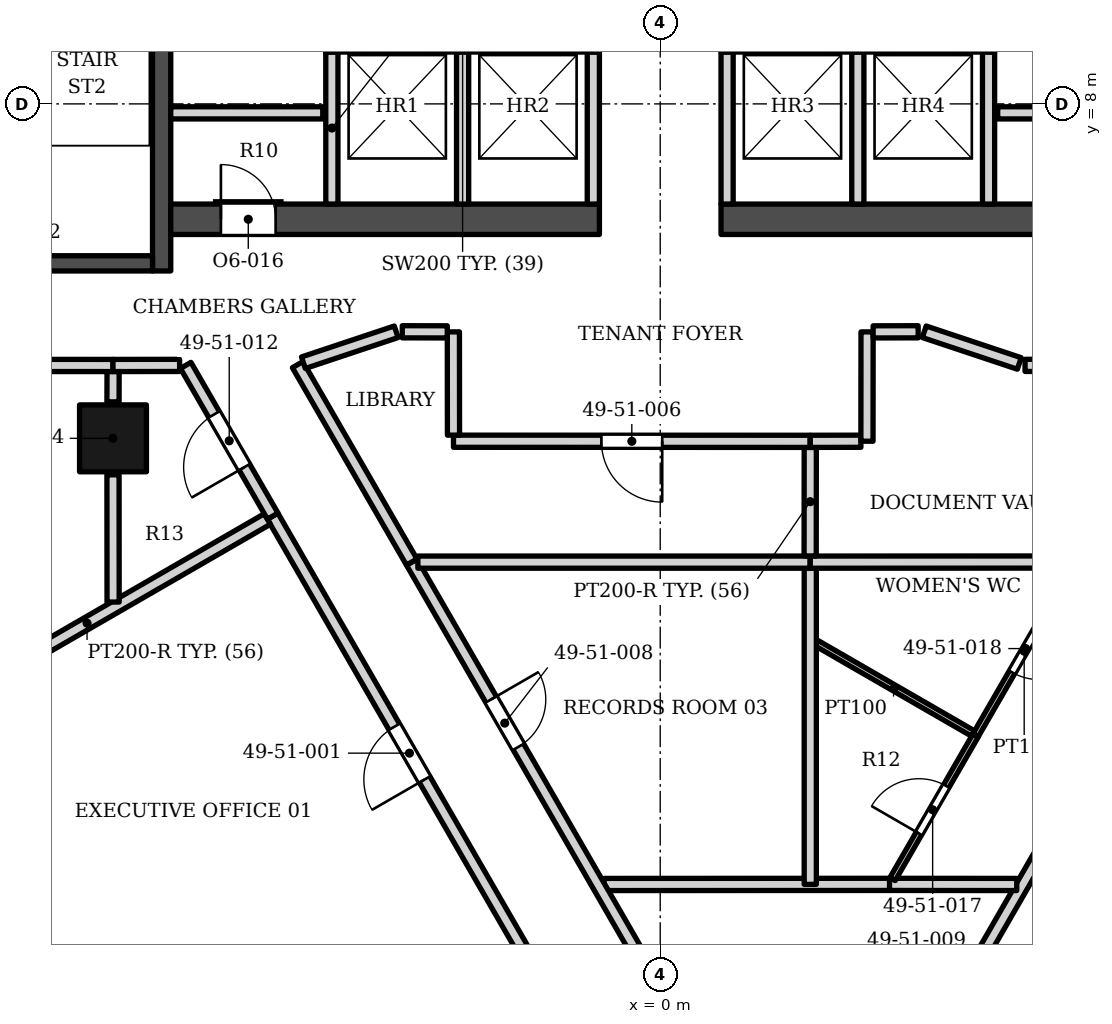
"""IFC4 building model, lengths in metres.
Left out: names, types, materials, properties, quantities, classifications, styles, units other than length and angle.
Written with IfcOpenShell. Run it as: python <this file> out.ifc"""

import sys

from ifc_helpers import new_model, si_unit, direction, frame, frame_2d, origin, origin_2d, place, context, subcontext, project, spatial, rectangle, extrude, element, fill, save


model = new_model("IFC4")
c1 = context("Model", 3, precision=1e-05, world=origin(), true_north=direction((0.0, 1.0)))
c2 = subcontext(c1, "Body", "Model", "MODEL_VIEW")
j1 = project(units=[si_unit("LENGTHUNIT", "METRE"), si_unit("PLANEANGLEUNIT", "RADIAN")], contexts=[c1])
p1 = place(None, origin())
s1 = spatial("IfcSite", under=j1, at=p1, CompositionType="ELEMENT")
p2 = place(p1, origin())
s2 = spatial("IfcBuilding", under=s1, at=p2, CompositionType="ELEMENT")
p3 = place(p2, frame((0.0, 0.0, 208.1)))
s3 = spatial("IfcBuildingStorey", under=s2, at=p3, CompositionType="ELEMENT", Elevation=208.1)
p4 = place(p3, frame((-8.2, 5.253, 0.0), z_axis=(0.0, 0.0, 1.0), x_axis=(0.0, 1.0, 0.0)))
e1 = element("IfcWall", 1, at=p4, inside=s3, PredefinedType="SHEAR", context=c2, shape_type="SweptSolid", body=[
    extrude(rectangle(XDim=13.3, YDim=0.3, at=frame_2d((6.65, 0.0))), origin(), (0.0, 0.0, 1.0), 3.9),
])
p5 = place(p4, frame((7.1, 0.0, 0.0)))
e2 = element("IfcOpeningElement", 2, at=p5, cuts=e1, PredefinedType="OPENING", context=c2, shape_type="SweptSolid", body=[
    extrude(rectangle(XDim=1.4, YDim=2.1, at=frame_2d((0.7, 1.05))), frame((0.0, 0.16, 0.0), z_axis=(0.0, -1.0, 0.0), x_axis=(1.0, 0.0, 0.0)), (0.0, 0.0, 1.0), 0.32),
])
p6 = place(p4, frame((5.05, 0.0, 0.0)))
e3 = element("IfcOpeningElement", 3, at=p6, cuts=e1, PredefinedType="OPENING", context=c2, shape_type="SweptSolid", body=[
    extrude(rectangle(XDim=1.4, YDim=2.1, at=frame_2d((0.7, 1.05))), frame((0.0, 0.16, 0.0), z_axis=(0.0, -1.0, 0.0), x_axis=(1.0, 0.0, 0.0)), (0.0, 0.0, 1.0), 0.32),
])
p7 = place(p3, frame((-12.1, 5.378, 0.0), z_axis=(0.0, 0.0, 1.0), x_axis=(1.0, 0.0, 0.0)))
e4 = element("IfcWall", 4, at=p7, inside=s3, PredefinedType="SHEAR", context=c2, shape_type="SweptSolid", body=[
    extrude(rectangle(XDim=3.75, YDim=0.25, at=frame_2d((1.875, 0.0))), origin(), (0.0, 0.0, 1.0), 3.9),
])
p8 = place(p3, frame((-8.05, 6.103, 0.0), z_axis=(0.0, 0.0, 1.0), x_axis=(1.0, 0.0, 0.0)))
e5 = element("IfcWall", 5, at=p8, inside=s3, PredefinedType="SHEAR", context=c2, shape_type="SweptSolid", body=[
    extrude(rectangle(XDim=7.05, YDim=0.5, at=frame_2d((3.525, 0.0))), origin(), (0.0, 0.0, 1.0), 3.9),
])
p9 = place(p8, frame((0.825, 0.0, 0.0)))
e6 = element("IfcOpeningElement", 6, at=p9, cuts=e5, PredefinedType="OPENING", context=c2, shape_type="SweptSolid", body=[
    extrude(rectangle(XDim=0.9, YDim=2.1, at=frame_2d((0.45, 1.05))), frame((0.0, 0.26, 0.0), z_axis=(0.0, -1.0, 0.0), x_axis=(1.0, 0.0, 0.0)), (0.0, 0.0, 1.0), 0.52),
])
p10 = place(p3, frame((1.0, 6.103, 0.0), z_axis=(0.0, 0.0, 1.0), x_axis=(1.0, 0.0, 0.0)))
e7 = element("IfcWall", 7, at=p10, inside=s3, PredefinedType="SHEAR", context=c2, shape_type="SweptSolid", body=[
    extrude(rectangle(XDim=7.05, YDim=0.5, at=frame_2d((3.525, 0.0))), origin(), (0.0, 0.0, 1.0), 3.9),
])
p11 = place(p10, frame((5.325, 0.0, 0.0)))
e8 = element("IfcOpeningElement", 8, at=p11, cuts=e7, PredefinedType="OPENING", context=c2, shape_type="SweptSolid", body=[
    extrude(rectangle(XDim=0.9, YDim=2.1, at=frame_2d((0.45, 1.05))), frame((0.0, 0.26, 0.0), z_axis=(0.0, -1.0, 0.0), x_axis=(1.0, 0.0, 0.0)), (0.0, 0.0, 1.0), 0.52),
])
p12 = place(p3, frame((-9.0, 2.5, 0.0), z_axis=(0.0, 0.0, 1.0), x_axis=(1.0, 0.0, 0.0)))
e9 = element("IfcColumn", 9, at=p12, inside=s3, PredefinedType="COLUMN", context=c2, shape_type="SweptSolid", body=[
    extrude(rectangle(XDim=1.1, YDim=1.1, at=origin_2d()), origin(), (0.0, 0.0, 1.0), 3.9),
])
for number, where, z_axis, x_axis in (
    (10, (-5.4, 6.353, 0.0), (0.0, 0.0, 1.0), (0.0, 1.0, 0.0)),
    (11, (-3.25, 6.353, 0.0), (0.0, 0.0, 1.0), (0.0, 1.0, 0.0)),
    (12, (-1.1, 6.353, 0.0), (0.0, 0.0, 1.0), (0.0, 1.0, 0.0)),
    (13, (1.1, 6.353, 0.0), (0.0, 0.0, 1.0), (0.0, 1.0, 0.0)),
    (14, (3.25, 6.353, 0.0), (0.0, 0.0, 1.0), (0.0, 1.0, 0.0)),
    (15, (5.4, 6.353, 0.0), (0.0, 0.0, 1.0), (0.0, 1.0, 0.0)),
    (16, (-8.05, 7.853, 0.0), (0.0, 0.0, 1.0), (1.0, 0.0, 0.0)),
    (17, (5.55, 7.853, 0.0), (0.0, 0.0, 1.0), (1.0, 0.0, 0.0)),
):
    element("IfcWall", number, at=place(p3, frame(where, z_axis=z_axis, x_axis=x_axis)), inside=s3, PredefinedType="SOLIDWALL", context=c2, shape_type="SweptSolid", body=[
        extrude(rectangle(XDim=2.5, YDim=0.2, at=frame_2d((1.25, 0.0))), origin(), (0.0, 0.0, 1.0), 3.73),
    ])
p13 = place(p3, frame((2.469, -10.893, 0.0), z_axis=(0.0, 0.0, 1.0), x_axis=(0.499769731946, 0.866158308296, 0.0)))
e18 = element("IfcWall", 18, at=p13, inside=s3, PredefinedType="PARTITIONING", context=c2, shape_type="SweptSolid", body=[
    extrude(rectangle(XDim=13.113, YDim=0.2, at=frame_2d((6.557, 0.0))), origin(), (0.0, 0.0, 1.0), 2.884),
])
p14 = place(p13, frame((3.048, 0.0, 0.0)))
e19 = element("IfcOpeningElement", 19, at=p14, cuts=e18, PredefinedType="OPENING", context=c2, shape_type="SweptSolid", body=[
    extrude(rectangle(XDim=0.9, YDim=2.1, at=frame_2d((0.45, 1.05))), frame((0.0, 0.11, 0.0), z_axis=(0.0, -1.0, 0.0), x_axis=(1.0, 0.0, 0.0)), (0.0, 0.0, 1.0), 0.22),
])
p15 = place(p13, frame((9.556, 0.0, 0.0)))
e20 = element("IfcOpeningElement", 20, at=p15, cuts=e18, PredefinedType="OPENING", context=c2, shape_type="SweptSolid", body=[
    extrude(rectangle(XDim=1.0, YDim=2.1, at=frame_2d((0.5, 1.05))), frame((0.0, 0.11, 0.0), z_axis=(0.0, -1.0, 0.0), x_axis=(1.0, 0.0, 0.0)), (0.0, 0.0, 1.0), 0.22),
])
p16 = place(p3, frame((-6.374, 1.22, 0.0), z_axis=(0.0, 0.0, 1.0), x_axis=(0.5000018851, -0.866024315419, 0.0)))
e21 = element("IfcWall", 21, at=p16, inside=s3, PredefinedType="PARTITIONING", context=c2, shape_type="SweptSolid", body=[
    extrude(rectangle(XDim=9.0, YDim=0.2, at=frame_2d((4.5, 0.0))), origin(), (0.0, 0.0, 1.0), 2.884),
])
p17 = place(p16, frame((4.0, 0.0, 0.0)))
e22 = element("IfcOpeningElement", 22, at=p17, cuts=e21, PredefinedType="OPENING", context=c2, shape_type="SweptSolid", body=[
    extrude(rectangle(XDim=1.0, YDim=2.4, at=frame_2d((0.5, 1.2))), frame((0.0, 0.11, 0.0), z_axis=(0.0, -1.0, 0.0), x_axis=(1.0, 0.0, 0.0)), (0.0, 0.0, 1.0), 0.22),
])
p18 = place(p3, frame((-0.925, -4.837, 0.0), z_axis=(0.0, 0.0, 1.0), x_axis=(0.999999933905, 0.000363579678, 0.0)))
e23 = element("IfcWall", 23, at=p18, inside=s3, PredefinedType="PARTITIONING", context=c2, shape_type="SweptSolid", body=[
    extrude(rectangle(XDim=4.7, YDim=0.2, at=frame_2d((2.35, 0.0))), origin(), (0.0, 0.0, 1.0), 3.73),
])
p19 = place(p3, frame((3.771, -4.835, 0.0), z_axis=(0.0, 0.0, 1.0), x_axis=(0.999999666495, -0.00081670723, 0.0)))
e24 = element("IfcWall", 24, at=p19, inside=s3, PredefinedType="PARTITIONING", context=c2, shape_type="SweptSolid", body=[
    extrude(rectangle(XDim=2.093, YDim=0.2, at=frame_2d((1.046, 0.0))), origin(), (0.0, 0.0, 1.0), 3.73),
])
p20 = place(p3, frame((3.821, -4.748, 0.0), z_axis=(0.0, 0.0, 1.0), x_axis=(0.500518638442, 0.865725760603, 0.0)))
e25 = element("IfcWall", 25, at=p20, inside=s3, PredefinedType="PARTITIONING", context=c2, shape_type="SweptSolid", body=[
    extrude(rectangle(XDim=2.733, YDim=0.1, at=frame_2d((1.367, 0.0))), origin(), (0.0, 0.0, 1.0), 2.884),
])
p21 = place(p20, frame((0.867, 0.0, 0.0)))
e26 = element("IfcOpeningElement", 26, at=p21, cuts=e25, PredefinedType="OPENING", context=c2, shape_type="SweptSolid", body=[
    extrude(rectangle(XDim=0.9, YDim=2.1, at=frame_2d((0.45, 1.05))), frame((0.0, 0.06, 0.0), z_axis=(0.0, -1.0, 0.0), x_axis=(1.0, 0.0, 0.0)), (0.0, 0.0, 1.0), 0.12),
])
p22 = place(p3, frame((5.189, -2.379, 0.0), z_axis=(0.0, 0.0, 1.0), x_axis=(0.500398861512, 0.865794998482, 0.0)))
e27 = element("IfcWall", 27, at=p22, inside=s3, PredefinedType="PARTITIONING", context=c2, shape_type="SweptSolid", body=[
    extrude(rectangle(XDim=3.187, YDim=0.1, at=frame_2d((1.593, 0.0))), origin(), (0.0, 0.0, 1.0), 3.73),
])
p23 = place(p22, frame((1.192, 0.0, 0.0)))
e28 = element("IfcOpeningElement", 28, at=p23, cuts=e27, PredefinedType="OPENING", context=c2, shape_type="SweptSolid", body=[
    extrude(rectangle(XDim=0.9, YDim=2.1, at=frame_2d((0.45, 1.05))), frame((0.0, 0.06, 0.0), z_axis=(0.0, -1.0, 0.0), x_axis=(1.0, 0.0, 0.0)), (0.0, 0.0, 1.0), 0.12),
])
p24 = place(p3, frame((-12.392, -2.254, 0.0), z_axis=(0.0, 0.0, 1.0), x_axis=(0.86583110311, 0.50033638773, 0.0)))
e29 = element("IfcWall", 29, at=p24, inside=s3, PredefinedType="PARTITIONING", context=c2, shape_type="SweptSolid", body=[
    extrude(rectangle(XDim=6.849, YDim=0.2, at=frame_2d((3.425, 0.0))), origin(), (0.0, 0.0, 1.0), 3.052),
])
p25 = place(p3, frame((2.552, -0.858, 0.0), z_axis=(0.0, 0.0, 1.0), x_axis=(0.866076950936, -0.499910707084, 0.0)))
e30 = element("IfcWall", 30, at=p25, inside=s3, PredefinedType="PARTITIONING", context=c2, shape_type="SweptSolid", body=[
    extrude(rectangle(XDim=2.994, YDim=0.1, at=frame_2d((1.497, 0.0))), origin(), (0.0, 0.0, 1.0), 2.884),
])
p26 = place(p3, frame((3.759, -11.864, 0.0), z_axis=(0.0, 0.0, 1.0), x_axis=(0.499997969693, 0.866026575979, 0.0)))
e31 = element("IfcWall", 31, at=p26, inside=s3, PredefinedType="PARTITIONING", context=c2, shape_type="SweptSolid", body=[
    extrude(rectangle(XDim=13.5, YDim=0.2, at=frame_2d((6.75, 0.0))), origin(), (0.0, 0.0, 1.0), 2.884),
])
p27 = place(p26, frame((1.8, 0.0, 0.0)))
e32 = element("IfcOpeningElement", 32, at=p27, cuts=e31, PredefinedType="OPENING", context=c2, shape_type="SweptSolid", body=[
    extrude(rectangle(XDim=0.9, YDim=2.1, at=frame_2d((0.45, 1.05))), frame((0.0, 0.11, 0.0), z_axis=(0.0, -1.0, 0.0), x_axis=(1.0, 0.0, 0.0)), (0.0, 0.0, 1.0), 0.22),
])
p28 = place(p26, frame((8.5, 0.0, 0.0)))
e33 = element("IfcOpeningElement", 33, at=p28, cuts=e31, PredefinedType="OPENING", context=c2, shape_type="SweptSolid", body=[
    extrude(rectangle(XDim=1.0, YDim=2.4, at=frame_2d((0.5, 1.2))), frame((0.0, 0.11, 0.0), z_axis=(0.0, -1.0, 0.0), x_axis=(1.0, 0.0, 0.0)), (0.0, 0.0, 1.0), 0.22),
])
p29 = place(p3, frame((2.468, -4.835, 0.0), z_axis=(0.0, 0.0, 1.0), x_axis=(0.0, 1.0, 0.0)))
e34 = element("IfcWall", 34, at=p29, inside=s3, PredefinedType="PARTITIONING", context=c2, shape_type="SweptSolid", body=[
    extrude(rectangle(XDim=5.199, YDim=0.2, at=frame_2d((2.6, 0.0))), origin(), (0.0, 0.0, 1.0), 3.73),
])
p30 = place(p3, frame((-4.086, 0.464, 0.0), z_axis=(0.0, 0.0, 1.0), x_axis=(0.499999074482, -0.866025938132, 0.0)))
e35 = element("IfcWall", 35, at=p30, inside=s3, PredefinedType="PARTITIONING", context=c2, shape_type="SweptSolid", body=[
    extrude(rectangle(XDim=13.013, YDim=0.2, at=frame_2d((6.507, 0.0))), origin(), (0.0, 0.0, 1.0), 2.884),
])
p31 = place(p30, frame((2.607, 0.0, 0.0)))
e36 = element("IfcOpeningElement", 36, at=p31, cuts=e35, PredefinedType="OPENING", context=c2, shape_type="SweptSolid", body=[
    extrude(rectangle(XDim=0.9, YDim=2.1, at=frame_2d((0.45, 1.05))), frame((0.0, 0.11, 0.0), z_axis=(0.0, -1.0, 0.0), x_axis=(1.0, 0.0, 0.0)), (0.0, 0.0, 1.0), 0.22),
])
p32 = place(p3, frame((-3.986, 0.464, 0.0), z_axis=(0.0, 0.0, 1.0), x_axis=(1.0, 0.0, 0.0)))
e37 = element("IfcWall", 37, at=p32, inside=s3, PredefinedType="PARTITIONING", context=c2, shape_type="SweptSolid", body=[
    extrude(rectangle(XDim=6.452, YDim=0.2, at=frame_2d((3.226, 0.0))), origin(), (0.0, 0.0, 1.0), 2.884),
])
p33 = place(p3, frame((2.468, 0.464, 0.0), z_axis=(0.0, 0.0, 1.0), x_axis=(0.999999923373, 0.000391476957, 0.0)))
e38 = element("IfcWall", 38, at=p33, inside=s3, PredefinedType="PARTITIONING", context=c2, shape_type="SweptSolid", body=[
    extrude(rectangle(XDim=4.365, YDim=0.2, at=frame_2d((2.183, 0.0))), origin(), (0.0, 0.0, 1.0), 3.73),
])
p34 = place(p3, frame((-7.804, 3.699, 0.0), z_axis=(0.0, 0.0, 1.0), x_axis=(0.500020309772, -0.866013677614, 0.0)))
e39 = element("IfcWall", 39, at=p34, inside=s3, PredefinedType="PARTITIONING", context=c2, shape_type="SweptSolid", body=[
    extrude(rectangle(XDim=2.862, YDim=0.2, at=frame_2d((1.431, 0.0))), origin(), (0.0, 0.0, 1.0), 3.73),
])
p35 = place(p34, frame((0.932, 0.0, 0.0)))
e40 = element("IfcOpeningElement", 40, at=p35, cuts=e39, PredefinedType="OPENING", context=c2, shape_type="SweptSolid", body=[
    extrude(rectangle(XDim=1.0, YDim=2.1, at=frame_2d((0.5, 1.05))), frame((0.0, 0.11, 0.0), z_axis=(0.0, -1.0, 0.0), x_axis=(1.0, 0.0, 0.0)), (0.0, 0.0, 1.0), 0.22),
])
p36 = place(p3, frame((-9.0, 1.9, 0.0), z_axis=(0.0, 0.0, 1.0), x_axis=(0.000816802528, -0.999999666417, 0.0)))
e41 = element("IfcWall", 41, at=p36, inside=s3, PredefinedType="PARTITIONING", context=c2, shape_type="SweptSolid", body=[
    extrude(rectangle(XDim=2.092, YDim=0.2, at=frame_2d((1.046, 0.0))), origin(), (0.0, 0.0, 1.0), 3.052),
])
p37 = place(p3, frame((2.466, 0.566, 0.0), z_axis=(0.0, 0.0, 1.0), x_axis=(0.000820793157, 0.999999663149, 0.0)))
e42 = element("IfcWall", 42, at=p37, inside=s3, PredefinedType="PARTITIONING", context=c2, shape_type="SweptSolid", body=[
    extrude(rectangle(XDim=1.785, YDim=0.2, at=frame_2d((0.892, 0.0))), origin(), (0.0, 0.0, 1.0), 3.73),
])
p38 = place(p3, frame((-3.4, 2.452, 0.0), z_axis=(0.0, 0.0, 1.0), x_axis=(0.999999957561, -0.000291338898, 0.0)))
e43 = element("IfcWall", 43, at=p38, inside=s3, PredefinedType="PARTITIONING", context=c2, shape_type="SweptSolid", body=[
    extrude(rectangle(XDim=5.866, YDim=0.2, at=frame_2d((2.933, 0.0))), origin(), (0.0, 0.0, 1.0), 3.73),
])
p39 = place(p38, frame((2.433, 0.0, 0.0)))
e44 = element("IfcOpeningElement", 44, at=p39, cuts=e43, PredefinedType="OPENING", context=c2, shape_type="SweptSolid", body=[
    extrude(rectangle(XDim=1.0, YDim=2.4, at=frame_2d((0.5, 1.2))), frame((0.0, 0.11, 0.0), z_axis=(0.0, -1.0, 0.0), x_axis=(1.0, 0.0, 0.0)), (0.0, 0.0, 1.0), 0.22),
])
p40 = place(p3, frame((2.468, 2.451, 0.0), z_axis=(0.0, 0.0, 1.0), x_axis=(0.999997893042, 0.002052781599, 0.0)))
e45 = element("IfcWall", 45, at=p40, inside=s3, PredefinedType="PARTITIONING", context=c2, shape_type="SweptSolid", body=[
    extrude(rectangle(XDim=0.833, YDim=0.2, at=frame_2d((0.416, 0.0))), origin(), (0.0, 0.0, 1.0), 3.73),
])
p41 = place(p3, frame((-3.402, 4.25, 0.0), z_axis=(0.0, 0.0, 1.0), x_axis=(0.001150250857, -0.999999338461, 0.0)))
e46 = element("IfcWall", 46, at=p41, inside=s3, PredefinedType="PARTITIONING", context=c2, shape_type="SweptSolid", body=[
    extrude(rectangle(XDim=1.698, YDim=0.2, at=frame_2d((0.849, 0.0))), origin(), (0.0, 0.0, 1.0), 3.73),
])
p42 = place(p3, frame((-9.0, 3.1, 0.0), z_axis=(0.0, 0.0, 1.0), x_axis=(0.00293253871, 0.999995700099, 0.0)))
e47 = element("IfcWall", 47, at=p42, inside=s3, PredefinedType="PARTITIONING", context=c2, shape_type="SweptSolid", body=[
    extrude(rectangle(XDim=0.5, YDim=0.2, at=frame_2d((0.25, 0.0))), origin(), (0.0, 0.0, 1.0), 3.332),
])
p43 = place(p3, frame((-14.4, 3.699, 0.0), z_axis=(0.0, 0.0, 1.0), x_axis=(0.999999963209, -0.000271259993, 0.0)))
e48 = element("IfcWall", 48, at=p43, inside=s3, PredefinedType="PARTITIONING", context=c2, shape_type="SweptSolid", body=[
    extrude(rectangle(XDim=5.4, YDim=0.2, at=frame_2d((2.7, 0.0))), origin(), (0.0, 0.0, 1.0), 3.73),
])
p44 = place(p43, frame((2.201, 0.0, 0.0)))
e49 = element("IfcOpeningElement", 49, at=p44, cuts=e48, PredefinedType="OPENING", context=c2, shape_type="SweptSolid", body=[
    extrude(rectangle(XDim=1.0, YDim=2.1, at=frame_2d((0.5, 1.05))), frame((0.0, 0.11, 0.0), z_axis=(0.0, -1.0, 0.0), x_axis=(1.0, 0.0, 0.0)), (0.0, 0.0, 1.0), 0.22),
])
p45 = place(p3, frame((-9.0, 3.698, 0.0), z_axis=(0.0, 0.0, 1.0), x_axis=(0.999999105954, 0.001337195149, 0.0)))
e50 = element("IfcWall", 50, at=p45, inside=s3, PredefinedType="PARTITIONING", context=c2, shape_type="SweptSolid", body=[
    extrude(rectangle(XDim=1.095, YDim=0.2, at=frame_2d((0.548, 0.0))), origin(), (0.0, 0.0, 1.0), 3.73),
])
p46 = place(p3, frame((6.0, 3.7, 0.0), z_axis=(0.0, 0.0, 1.0), x_axis=(1.0, 0.0, 0.0)))
e51 = element("IfcWall", 51, at=p46, inside=s3, PredefinedType="PARTITIONING", context=c2, shape_type="SweptSolid", body=[
    extrude(rectangle(XDim=4.894, YDim=0.2, at=frame_2d((2.447, 0.0))), origin(), (0.0, 0.0, 1.0), 3.332),
])
p47 = place(p46, frame((1.347, 0.0, 0.0)))
e52 = element("IfcOpeningElement", 52, at=p47, cuts=e51, PredefinedType="OPENING", context=c2, shape_type="SweptSolid", body=[
    extrude(rectangle(XDim=1.0, YDim=2.1, at=frame_2d((0.5, 1.05))), frame((0.0, 0.11, 0.0), z_axis=(0.0, -1.0, 0.0), x_axis=(1.0, 0.0, 0.0)), (0.0, 0.0, 1.0), 0.22),
])
p48 = place(p3, frame((-5.963, 3.712, 0.0), z_axis=(0.0, 0.0, 1.0), x_axis=(0.500417539209, -0.865784203166, 0.0)))
e53 = element("IfcWall", 53, at=p48, inside=s3, PredefinedType="PARTITIONING", context=c2, shape_type="SweptSolid", body=[
    extrude(rectangle(XDim=3.749, YDim=0.2, at=frame_2d((1.875, 0.0))), origin(), (0.0, 0.0, 1.0), 2.884),
])
p49 = place(p3, frame((4.342, 4.252, 0.0), z_axis=(0.0, 0.0, 1.0), x_axis=(0.948668476379, -0.316272227557, 0.0)))
e54 = element("IfcWall", 54, at=p49, inside=s3, PredefinedType="PARTITIONING", context=c2, shape_type="SweptSolid", body=[
    extrude(rectangle(XDim=1.647, YDim=0.2, at=frame_2d((0.824, 0.0))), origin(), (0.0, 0.0, 1.0), 2.884),
])
p50 = place(p3, frame((-5.868, 3.744, 0.0), z_axis=(0.0, 0.0, 1.0), x_axis=(0.948652936785, 0.316318835242, 0.0)))
e55 = element("IfcWall", 55, at=p50, inside=s3, PredefinedType="PARTITIONING", context=c2, shape_type="SweptSolid", body=[
    extrude(rectangle(XDim=1.608, YDim=0.2, at=frame_2d((0.804, 0.0))), origin(), (0.0, 0.0, 1.0), 2.884),
])
p51 = place(p3, frame((-4.242, 4.252, 0.0), z_axis=(0.0, 0.0, 1.0), x_axis=(0.999998041999, -0.001978887946, 0.0)))
e56 = element("IfcWall", 56, at=p51, inside=s3, PredefinedType="PARTITIONING", context=c2, shape_type="SweptSolid", body=[
    extrude(rectangle(XDim=0.74, YDim=0.2, at=frame_2d((0.37, 0.0))), origin(), (0.0, 0.0, 1.0), 3.73),
])
p52 = place(p3, frame((3.4, 2.452, 0.0), z_axis=(0.0, 0.0, 1.0), x_axis=(0.001086217961, 0.999999410065, 0.0)))
e57 = element("IfcWall", 57, at=p52, inside=s3, PredefinedType="PARTITIONING", context=c2, shape_type="SweptSolid", body=[
    extrude(rectangle(XDim=1.798, YDim=0.2, at=frame_2d((0.899, 0.0))), origin(), (0.0, 0.0, 1.0), 3.73),
])
p53 = place(p3, frame((3.502, 4.251, 0.0), z_axis=(0.0, 0.0, 1.0), x_axis=(0.999998041999, 0.001978887946, 0.0)))
e58 = element("IfcWall", 58, at=p53, inside=s3, PredefinedType="PARTITIONING", context=c2, shape_type="SweptSolid", body=[
    extrude(rectangle(XDim=0.74, YDim=0.2, at=frame_2d((0.37, 0.0))), origin(), (0.0, 0.0, 1.0), 3.73),
])
p54 = place(p9, origin())
e59 = element("IfcDoor", 59, at=p54, inside=s3, OperationType="SINGLE_SWING_LEFT", PredefinedType="DOOR", context=c2, shape_type="SweptSolid", body=[
    extrude(rectangle(XDim=0.9, YDim=2.1, at=frame_2d((0.45, 1.05))), frame((0.0, 0.025, 0.0), z_axis=(0.0, -1.0, 0.0), x_axis=(1.0, 0.0, 0.0)), (0.0, 0.0, 1.0), 0.05),
])
fill(e6, e59)
p55 = place(p17, origin())
e60 = element("IfcDoor", 60, at=p55, inside=s3, OperationType="SINGLE_SWING_RIGHT", PredefinedType="DOOR", context=c2, shape_type="SweptSolid", body=[
    extrude(rectangle(XDim=1.0, YDim=2.4, at=frame_2d((0.5, 1.2))), frame((0.0, 0.025, 0.0), z_axis=(0.0, -1.0, 0.0), x_axis=(1.0, 0.0, 0.0)), (0.0, 0.0, 1.0), 0.05),
])
fill(e22, e60)
p56 = place(p39, origin())
e61 = element("IfcDoor", 61, at=p56, inside=s3, OperationType="SINGLE_SWING_RIGHT", PredefinedType="DOOR", context=c2, shape_type="SweptSolid", body=[
    extrude(rectangle(XDim=1.0, YDim=2.4, at=frame_2d((0.5, 1.2))), frame((0.0, 0.025, 0.0), z_axis=(0.0, -1.0, 0.0), x_axis=(1.0, 0.0, 0.0)), (0.0, 0.0, 1.0), 0.05),
])
fill(e44, e61)
p57 = place(p31, origin())
e62 = element("IfcDoor", 62, at=p57, inside=s3, OperationType="SINGLE_SWING_LEFT", PredefinedType="DOOR", context=c2, shape_type="SweptSolid", body=[
    extrude(rectangle(XDim=0.9, YDim=2.1, at=frame_2d((0.45, 1.05))), frame((0.0, 0.025, 0.0), z_axis=(0.0, -1.0, 0.0), x_axis=(1.0, 0.0, 0.0)), (0.0, 0.0, 1.0), 0.05),
])
fill(e36, e62)
p58 = place(p35, origin())
e63 = element("IfcDoor", 63, at=p58, inside=s3, OperationType="SINGLE_SWING_RIGHT", PredefinedType="DOOR", context=c2, shape_type="SweptSolid", body=[
    extrude(rectangle(XDim=1.0, YDim=2.1, at=frame_2d((0.5, 1.05))), frame((0.0, 0.025, 0.0), z_axis=(0.0, -1.0, 0.0), x_axis=(1.0, 0.0, 0.0)), (0.0, 0.0, 1.0), 0.05),
])
fill(e40, e63)
p59 = place(p21, origin())
e64 = element("IfcDoor", 64, at=p59, inside=s3, OperationType="SINGLE_SWING_LEFT", PredefinedType="DOOR", context=c2, shape_type="SweptSolid", body=[
    extrude(rectangle(XDim=0.9, YDim=2.1, at=frame_2d((0.45, 1.05))), frame((0.0, 0.025, 0.0), z_axis=(0.0, -1.0, 0.0), x_axis=(1.0, 0.0, 0.0)), (0.0, 0.0, 1.0), 0.05),
])
fill(e26, e64)
p60 = place(p23, origin())
e65 = element("IfcDoor", 65, at=p60, inside=s3, OperationType="SINGLE_SWING_RIGHT", PredefinedType="DOOR", context=c2, shape_type="SweptSolid", body=[
    extrude(rectangle(XDim=0.9, YDim=2.1, at=frame_2d((0.45, 1.05))), frame((0.0, 0.025, 0.0), z_axis=(0.0, -1.0, 0.0), x_axis=(1.0, 0.0, 0.0)), (0.0, 0.0, 1.0), 0.05),
])
fill(e28, e65)
save(model, sys.argv[1])
